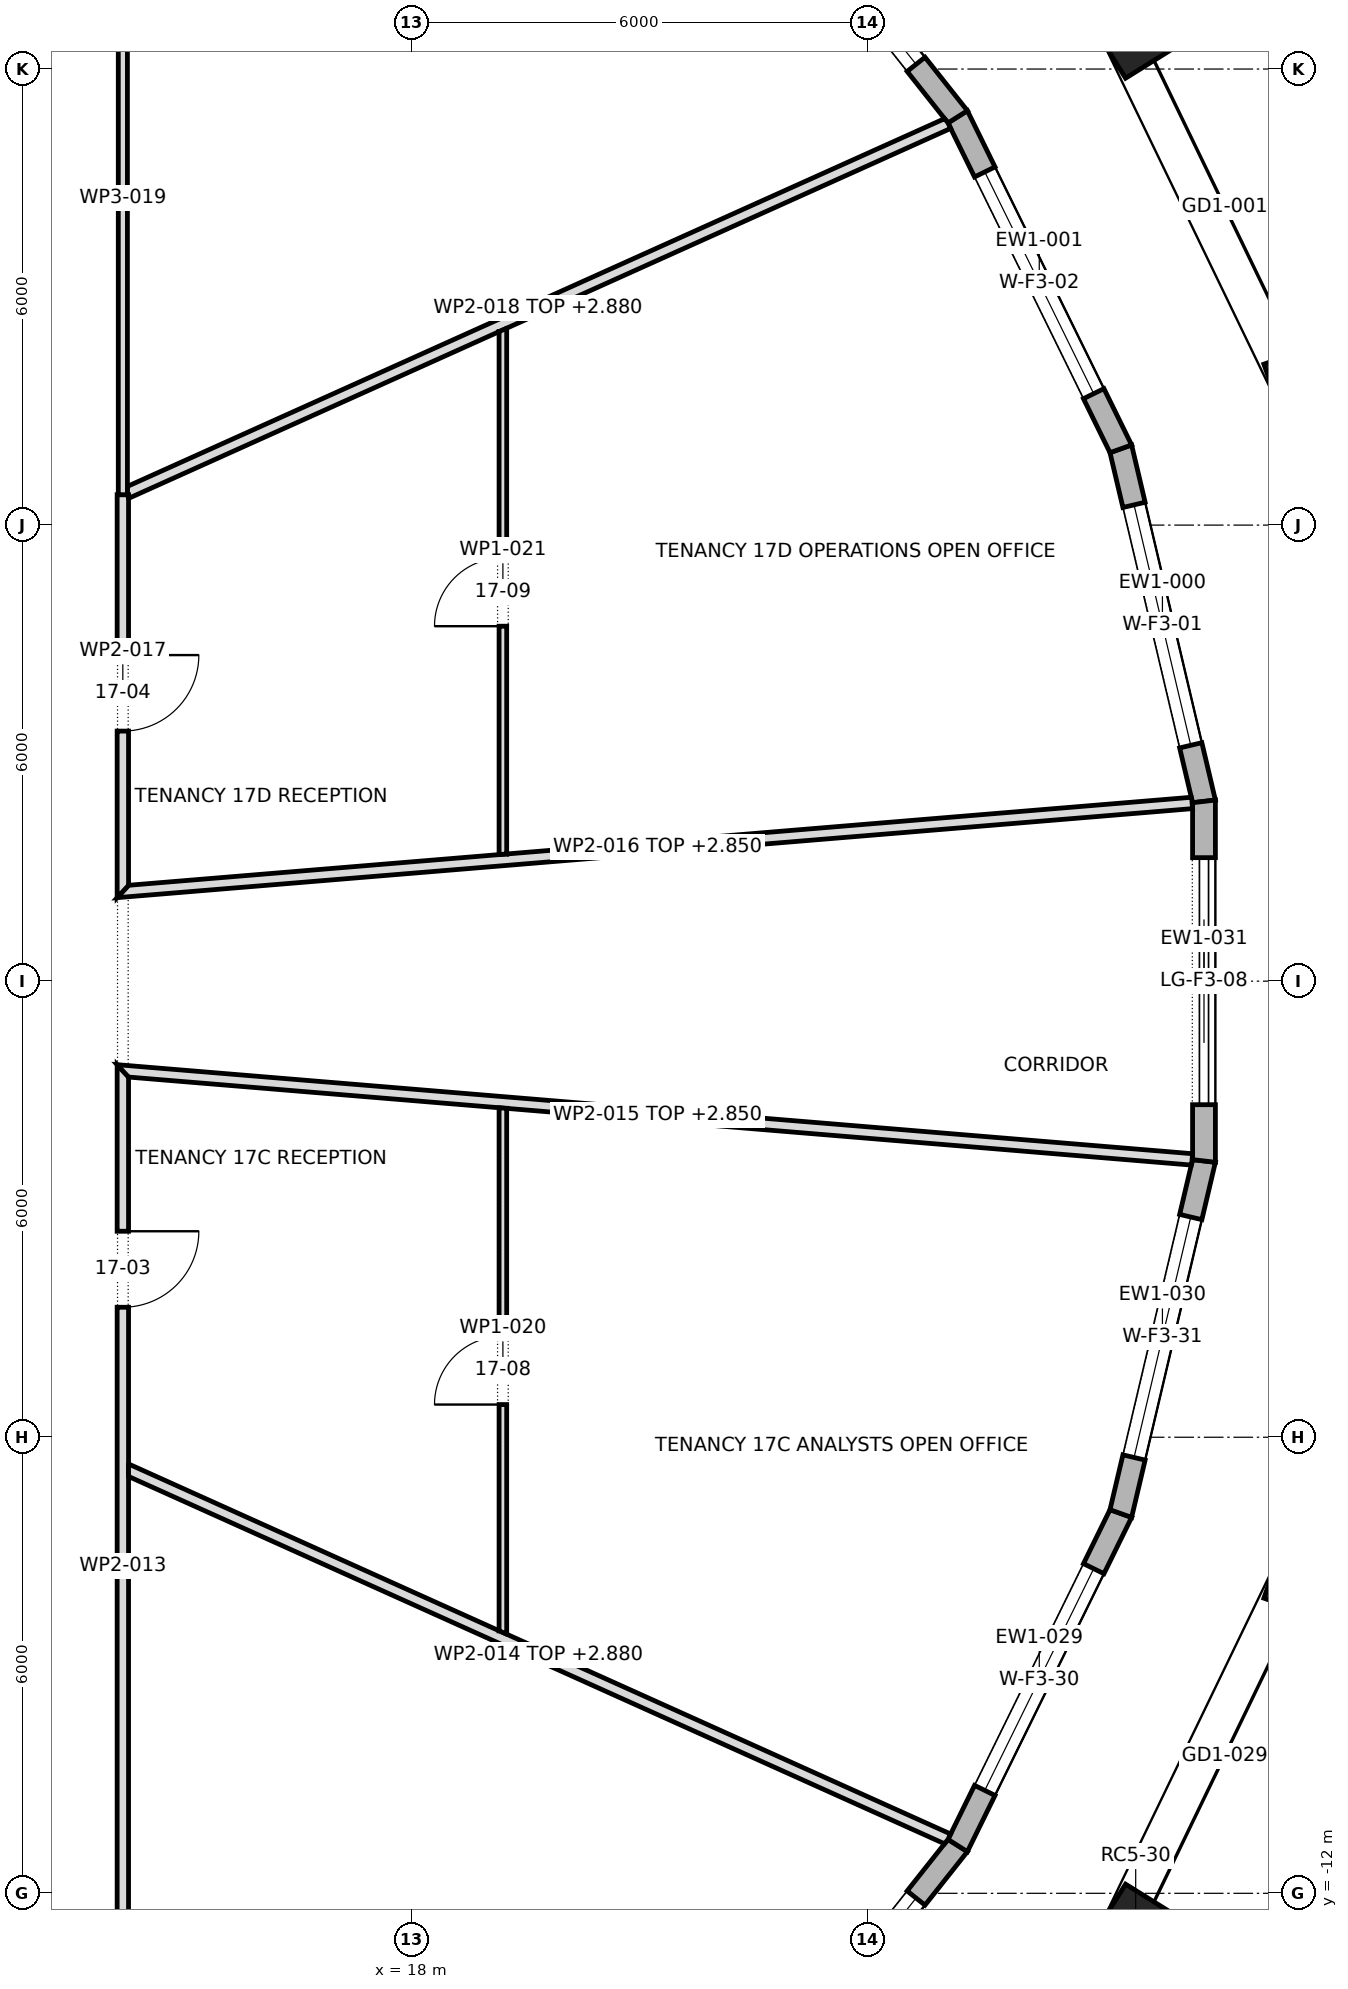
"""IFC4 building model, lengths in metres.
Left out: names, types, materials, properties, quantities, classifications, styles, units other than length and angle.
Written with IfcOpenShell. Run it as: python <this file> out.ifc"""

import sys

from ifc_helpers import new_model, si_unit, direction, frame, frame_2d, origin, origin_2d, place, context, subcontext, project, spatial, polyline, rectangle, outline, extrude, element, fill, save


model = new_model("IFC4")
c1 = context("Model", 3, precision=1e-05, world=origin(), true_north=direction((0.0, 1.0)))
c2 = subcontext(c1, "Body", "Model", "MODEL_VIEW")
j1 = project(units=[si_unit("LENGTHUNIT", "METRE"), si_unit("PLANEANGLEUNIT", "RADIAN")], contexts=[c1])
p1 = place(None, origin())
s1 = spatial("IfcSite", under=j1, at=p1, CompositionType="ELEMENT")
p2 = place(p1, origin())
s2 = spatial("IfcBuilding", under=s1, at=p2, CompositionType="ELEMENT")
p3 = place(p2, frame((0.0, 0.0, 238.9)))
s3 = spatial("IfcBuildingStorey", under=s2, at=p3, CompositionType="ELEMENT", Elevation=238.9)
for number, where, z_axis, x_axis in (
    (1, (29.867, 7.766, 0.0), (0.0, 0.0, 1.0), (-0.334, 0.943, 0.0)),
    (2, (27.525, 12.611, 0.0), (0.0, 0.0, 1.0), (-0.529, 0.849, 0.0)),
    (3, (27.525, -12.611, 0.0), (0.0, 0.0, 1.0), (0.529, 0.849, 0.0)),
    (4, (29.867, -7.766, 0.0), (0.0, 0.0, 1.0), (0.334, 0.943, 0.0)),
):
    element("IfcColumn", number, at=place(p3, frame(where, z_axis=z_axis, x_axis=x_axis)), inside=s3, PredefinedType="COLUMN", context=c2, shape_type="SweptSolid", body=[
        extrude(rectangle(XDim=1.1, YDim=1.0, at=origin_2d()), origin(), (0.0, 0.0, 1.0), 4.0),
    ])
p4 = place(p3, frame((28.424, 2.365, 0.0), z_axis=(0.0, 0.0, 1.0), x_axis=(-0.229593205094, 0.973286679337, 0.0)))
e5 = element("IfcWall", 5, at=p4, inside=s3, PredefinedType="STANDARD", context=c2, shape_type="SweptSolid", body=[
    extrude(outline(polyline([(-0.018, -0.15), (4.783, -0.15), (4.749, 0.15), (0.018, 0.15), (-0.018, -0.15)])), origin(), (0.0, 0.0, 1.0), 3.7),
])
p5 = place(p4, frame((0.758, 0.0, 0.6)))
e6 = element("IfcOpeningElement", 6, at=p5, cuts=e5, PredefinedType="OPENING", context=c2, shape_type="SweptSolid", body=[
    extrude(rectangle(XDim=3.25, YDim=2.65, at=frame_2d((1.625, 1.325))), frame((0.0, 0.162, 0.0), z_axis=(0.0, -1.0, 0.0), x_axis=(1.0, 0.0, 0.0)), (0.0, 0.0, 1.0), 0.324),
])
p6 = place(p3, frame((27.329, 7.004, 0.0), z_axis=(0.0, 0.0, 1.0), x_axis=(-0.441001730708, 0.897506252632, 0.0)))
e7 = element("IfcWall", 7, at=p6, inside=s3, PredefinedType="STANDARD", context=c2, shape_type="SweptSolid", body=[
    extrude(outline(polyline([(-0.017, -0.15), (4.882, -0.15), (4.85, 0.15), (0.017, 0.15), (-0.017, -0.15)])), origin(), (0.0, 0.0, 1.0), 3.7),
])
p7 = place(p6, frame((0.808, 0.0, 0.6)))
e8 = element("IfcOpeningElement", 8, at=p7, cuts=e7, PredefinedType="OPENING", context=c2, shape_type="SweptSolid", body=[
    extrude(rectangle(XDim=3.25, YDim=2.65, at=frame_2d((1.625, 1.325))), frame((0.0, 0.162, 0.0), z_axis=(0.0, -1.0, 0.0), x_axis=(1.0, 0.0, 0.0)), (0.0, 0.0, 1.0), 0.324),
])
p8 = place(p3, frame((25.183, 11.371, 0.0), z_axis=(0.0, 0.0, 1.0), x_axis=(-0.621130746167, 0.783706958094, 0.0)))
e9 = element("IfcWall", 9, at=p8, inside=s3, PredefinedType="STANDARD", context=c2, shape_type="SweptSolid", body=[
    extrude(outline(polyline([(-0.016, -0.15), (5.028, -0.15), (4.998, 0.15), (0.016, 0.15), (-0.016, -0.15)])), origin(), (0.0, 0.0, 1.0), 3.7),
])
p9 = place(p8, frame((0.881, 0.0, 0.6)))
e10 = element("IfcOpeningElement", 10, at=p9, cuts=e9, PredefinedType="OPENING", context=c2, shape_type="SweptSolid", body=[
    extrude(rectangle(XDim=3.25, YDim=2.65, at=frame_2d((1.625, 1.325))), frame((0.0, 0.162, 0.0), z_axis=(0.0, -1.0, 0.0), x_axis=(1.0, 0.0, 0.0)), (0.0, 0.0, 1.0), 0.324),
])
p10 = place(p3, frame((22.07, -15.3, 0.0), z_axis=(0.0, 0.0, 1.0), x_axis=(0.621130746167, 0.783706958094, 0.0)))
e11 = element("IfcWall", 11, at=p10, inside=s3, PredefinedType="STANDARD", context=c2, shape_type="SweptSolid", body=[
    extrude(outline(polyline([(-0.015, -0.15), (5.029, -0.15), (4.997, 0.15), (0.015, 0.15), (-0.015, -0.15)])), origin(), (0.0, 0.0, 1.0), 3.7),
])
p11 = place(p10, frame((0.881, 0.0, 0.6)))
e12 = element("IfcOpeningElement", 12, at=p11, cuts=e11, PredefinedType="OPENING", context=c2, shape_type="SweptSolid", body=[
    extrude(rectangle(XDim=3.25, YDim=2.65, at=frame_2d((1.625, 1.325))), frame((0.0, 0.162, 0.0), z_axis=(0.0, -1.0, 0.0), x_axis=(1.0, 0.0, 0.0)), (0.0, 0.0, 1.0), 0.324),
])
p12 = place(p3, frame((25.183, -11.371, 0.0), z_axis=(0.0, 0.0, 1.0), x_axis=(0.441001730708, 0.897506252632, 0.0)))
e13 = element("IfcWall", 13, at=p12, inside=s3, PredefinedType="STANDARD", context=c2, shape_type="SweptSolid", body=[
    extrude(outline(polyline([(-0.016, -0.15), (4.883, -0.15), (4.849, 0.15), (0.016, 0.15), (-0.016, -0.15)])), origin(), (0.0, 0.0, 1.0), 3.7),
])
p13 = place(p12, frame((0.808, 0.0, 0.6)))
e14 = element("IfcOpeningElement", 14, at=p13, cuts=e13, PredefinedType="OPENING", context=c2, shape_type="SweptSolid", body=[
    extrude(rectangle(XDim=3.25, YDim=2.65, at=frame_2d((1.625, 1.325))), frame((0.0, 0.162, 0.0), z_axis=(0.0, -1.0, 0.0), x_axis=(1.0, 0.0, 0.0)), (0.0, 0.0, 1.0), 0.324),
])
p14 = place(p3, frame((27.329, -7.004, 0.0), z_axis=(0.0, 0.0, 1.0), x_axis=(0.229593205094, 0.973286679337, 0.0)))
e15 = element("IfcWall", 15, at=p14, inside=s3, PredefinedType="STANDARD", context=c2, shape_type="SweptSolid", body=[
    extrude(outline(polyline([(-0.017, -0.15), (4.783, -0.15), (4.748, 0.15), (0.017, 0.15), (-0.017, -0.15)])), origin(), (0.0, 0.0, 1.0), 3.7),
])
p15 = place(p14, frame((0.758, 0.0, 0.6)))
e16 = element("IfcOpeningElement", 16, at=p15, cuts=e15, PredefinedType="OPENING", context=c2, shape_type="SweptSolid", body=[
    extrude(rectangle(XDim=3.25, YDim=2.65, at=frame_2d((1.625, 1.325))), frame((0.0, 0.162, 0.0), z_axis=(0.0, -1.0, 0.0), x_axis=(1.0, 0.0, 0.0)), (0.0, 0.0, 1.0), 0.324),
])
p16 = place(p3, frame((28.424, -2.365, 0.0), z_axis=(0.0, 0.0, 1.0), x_axis=(0.0, 1.0, 0.0)))
e17 = element("IfcWall", 17, at=p16, inside=s3, PredefinedType="STANDARD", context=c2, shape_type="SweptSolid", body=[
    extrude(outline(polyline([(-0.018, -0.15), (4.748, -0.15), (4.713, 0.15), (0.018, 0.15), (-0.018, -0.15)])), origin(), (0.0, 0.0, 1.0), 3.7),
])
p17 = place(p16, frame((0.74, 0.0, 0.0)))
e18 = element("IfcOpeningElement", 18, at=p17, cuts=e17, PredefinedType="OPENING", context=c2, shape_type="SweptSolid", body=[
    extrude(rectangle(XDim=3.25, YDim=3.25, at=frame_2d((1.625, 1.625))), frame((0.0, 0.162, 0.0), z_axis=(0.0, -1.0, 0.0), x_axis=(1.0, 0.0, 0.0)), (0.0, 0.0, 1.0), 0.324),
])
p18 = place(p3, frame((14.2, -14.275, 0.0), z_axis=(0.0, 0.0, 1.0), x_axis=(0.0, 1.0, 0.0)))
e19 = element("IfcWall", 19, at=p18, inside=s3, PredefinedType="PARTITIONING", context=c2, shape_type="SweptSolid", body=[
    extrude(outline(polyline([(0.0, -0.075), (1.859, -0.075), (3.718, -0.075), (5.577, -0.075), (7.436, -0.075), (9.295, -0.075), (11.155, -0.075), (13.013, -0.075), (13.176, 0.075), (11.315, 0.075), (9.455, 0.075), (7.594, 0.075), (5.733, 0.075), (3.872, 0.075), (2.011, 0.075), (0.15, 0.075), (0.0, -0.075)])), origin(), (0.0, 0.0, 1.0), 3.7),
])
p19 = place(p18, frame((9.985, 0.0, 0.0)))
e20 = element("IfcOpeningElement", 20, at=p19, cuts=e19, PredefinedType="OPENING", context=c2, shape_type="SweptSolid", body=[
    extrude(rectangle(XDim=1.0, YDim=2.1, at=frame_2d((0.5, 1.05))), frame((0.0, 0.087, 0.0), z_axis=(0.0, -1.0, 0.0), x_axis=(1.0, 0.0, 0.0)), (0.0, 0.0, 1.0), 0.174),
])
p20 = place(p3, frame((14.245, -6.42, 0.0), z_axis=(0.0, 0.0, 1.0), x_axis=(0.911879517983, -0.410457969448, 0.0)))
e21 = element("IfcWall", 21, at=p20, inside=s3, PredefinedType="PARTITIONING", context=c2, shape_type="SweptSolid", body=[
    extrude(outline(polyline([(0.067, -0.075), (2.029, -0.075), (3.991, -0.075), (5.953, -0.075), (7.916, -0.075), (9.878, -0.075), (11.84, -0.075), (11.858, -0.004), (11.86, 0.075), (10.233, 0.075), (8.605, 0.075), (6.977, 0.075), (5.349, 0.075), (5.346, 0.073), (5.346, 0.075), (3.564, 0.075), (1.782, 0.075), (0.0, 0.075), (0.0, 0.074), (0.067, -0.075)])), origin(), (0.0, 0.0, 1.0), 2.88),
])
p21 = place(p3, frame((14.119, -1.173, 0.0), z_axis=(0.0, 0.0, 1.0), x_axis=(0.996590090632, -0.082511764333, 0.0)))
e22 = element("IfcWall", 22, at=p21, inside=s3, PredefinedType="PARTITIONING", context=c2, shape_type="SweptSolid", body=[
    extrude(outline(polyline([(0.163, -0.075), (1.823, -0.075), (3.484, -0.075), (5.144, -0.075), (5.155, -0.074), (5.155, -0.075), (6.962, -0.075), (8.77, -0.075), (10.577, -0.075), (12.385, -0.075), (14.193, -0.075), (14.197, -0.048), (14.197, 0.075), (12.422, 0.075), (10.647, 0.075), (8.873, 0.075), (7.098, 0.075), (5.324, 0.075), (3.549, 0.075), (1.775, 0.075), (0.0, 0.075), (0.081, 0.0), (0.163, -0.075)])), origin(), (0.0, 0.0, 1.0), 2.85),
])
p22 = place(p3, frame((14.119, 1.173, 0.0), z_axis=(0.0, 0.0, 1.0), x_axis=(0.996590090632, 0.082511764333, 0.0)))
e23 = element("IfcWall", 23, at=p22, inside=s3, PredefinedType="PARTITIONING", context=c2, shape_type="SweptSolid", body=[
    extrude(outline(polyline([(14.197, -0.075), (14.197, 0.048), (14.193, 0.075), (12.385, 0.075), (10.577, 0.075), (8.77, 0.075), (6.962, 0.075), (5.155, 0.075), (5.155, 0.074), (5.144, 0.075), (3.484, 0.075), (1.823, 0.075), (0.163, 0.075), (0.081, 0.0), (0.0, -0.075), (1.775, -0.075), (3.549, -0.075), (5.324, -0.075), (7.098, -0.075), (8.873, -0.075), (10.647, -0.075), (12.422, -0.075), (14.197, -0.075)])), origin(), (0.0, 0.0, 1.0), 2.85),
])
p23 = place(p3, frame((14.2, 6.4, 0.0), z_axis=(0.0, 0.0, 1.0), x_axis=(0.0, -1.0, 0.0)))
e24 = element("IfcWall", 24, at=p23, inside=s3, PredefinedType="PARTITIONING", context=c2, shape_type="SweptSolid", body=[
    extrude(outline(polyline([(0.0, -0.075), (1.767, -0.075), (3.534, -0.075), (5.301, -0.075), (5.138, 0.075), (3.426, 0.075), (1.713, 0.075), (0.0, 0.075), (0.0, -0.075)])), origin(), (0.0, 0.0, 1.0), 3.7),
])
p24 = place(p23, frame((2.11, 0.0, 0.0)))
e25 = element("IfcOpeningElement", 25, at=p24, cuts=e24, PredefinedType="OPENING", context=c2, shape_type="SweptSolid", body=[
    extrude(rectangle(XDim=1.0, YDim=2.1, at=frame_2d((0.5, 1.05))), frame((0.0, 0.087, 0.0), z_axis=(0.0, -1.0, 0.0), x_axis=(1.0, 0.0, 0.0)), (0.0, 0.0, 1.0), 0.174),
])
p25 = place(p3, frame((14.245, 6.42, 0.0), z_axis=(0.0, 0.0, 1.0), x_axis=(0.911924971597, 0.410356974082, 0.0)))
e26 = element("IfcWall", 26, at=p25, inside=s3, PredefinedType="PARTITIONING", context=c2, shape_type="SweptSolid", body=[
    extrude(outline(polyline([(0.0, -0.075), (1.782, -0.075), (3.564, -0.075), (5.345, -0.075), (5.346, -0.073), (5.351, -0.075), (6.978, -0.075), (8.605, -0.075), (10.233, -0.075), (11.86, -0.075), (11.86, -0.074), (11.858, 0.005), (11.84, 0.075), (9.875, 0.075), (7.91, 0.075), (5.945, 0.075), (3.98, 0.075), (2.015, 0.075), (0.051, 0.075), (0.006, -0.025), (0.02, -0.031), (0.0, -0.074), (0.0, -0.075)])), origin(), (0.0, 0.0, 1.0), 2.88),
])
p26 = place(p3, frame((14.2, 14.26, 0.0), z_axis=(0.0, 0.0, 1.0), x_axis=(0.0, -1.0, 0.0)))
e27 = element("IfcWall", 27, at=p26, inside=s3, PredefinedType="PARTITIONING", context=c2, shape_type="SweptSolid", body=[
    extrude(outline(polyline([(7.86, 0.06), (5.895, 0.06), (3.93, 0.06), (1.965, 0.06), (0.0, 0.06), (0.12, -0.06), (2.055, -0.06), (3.99, -0.06), (5.925, -0.06), (7.86, -0.06), (7.86, 0.06)])), origin(), (0.0, 0.0, 1.0), 3.7),
])
p27 = place(p3, frame((19.2, -1.666, 0.0), z_axis=(0.0, 0.0, 1.0), x_axis=(0.0, -1.0, 0.0)))
e28 = element("IfcWall", 28, at=p27, inside=s3, PredefinedType="PARTITIONING", context=c2, shape_type="SweptSolid", body=[
    extrude(outline(polyline([(0.0, -0.05), (1.72, -0.05), (3.44, -0.05), (5.16, -0.05), (6.88, -0.05), (6.925, 0.049), (6.925, 0.05), (5.196, 0.05), (3.467, 0.05), (1.737, 0.05), (0.008, 0.05), (0.0, -0.045), (0.0, -0.05)])), origin(), (0.0, 0.0, 1.0), 3.7),
])
p28 = place(p27, frame((3.004, 0.0, 0.0)))
e29 = element("IfcOpeningElement", 29, at=p28, cuts=e28, PredefinedType="OPENING", context=c2, shape_type="SweptSolid", body=[
    extrude(rectangle(XDim=0.9, YDim=2.1, at=frame_2d((0.45, 1.05))), frame((0.0, 0.062, 0.0), z_axis=(0.0, -1.0, 0.0), x_axis=(1.0, 0.0, 0.0)), (0.0, 0.0, 1.0), 0.124),
])
p29 = place(p3, frame((19.2, 8.59, 0.0), z_axis=(0.0, 0.0, 1.0), x_axis=(0.0, -1.0, 0.0)))
e30 = element("IfcWall", 30, at=p29, inside=s3, PredefinedType="PARTITIONING", context=c2, shape_type="SweptSolid", body=[
    extrude(outline(polyline([(6.925, -0.05), (6.925, -0.045), (6.917, 0.05), (5.188, 0.05), (3.458, 0.05), (1.729, 0.05), (0.0, 0.05), (0.0, 0.05), (0.045, -0.05), (1.765, -0.05), (3.485, -0.05), (5.205, -0.05), (6.925, -0.05)])), origin(), (0.0, 0.0, 1.0), 3.7),
])
p30 = place(p29, frame((3.02, 0.0, 0.0)))
e31 = element("IfcOpeningElement", 31, at=p30, cuts=e30, PredefinedType="OPENING", context=c2, shape_type="SweptSolid", body=[
    extrude(rectangle(XDim=0.9, YDim=2.1, at=frame_2d((0.45, 1.05))), frame((0.0, 0.062, 0.0), z_axis=(0.0, -1.0, 0.0), x_axis=(1.0, 0.0, 0.0)), (0.0, 0.0, 1.0), 0.124),
])
p31 = place(p5, origin())
e32 = element("IfcWindow", 32, at=p31, inside=s3, PartitioningType="TRIPLE_PANEL_VERTICAL", PredefinedType="WINDOW", context=c2, shape_type="SweptSolid", body=[
    extrude(rectangle(XDim=3.25, YDim=2.65, at=frame_2d((1.625, 1.325))), frame((0.0, 0.03, 0.0), z_axis=(0.0, -1.0, 0.0), x_axis=(1.0, 0.0, 0.0)), (0.0, 0.0, 1.0), 0.06),
])
fill(e6, e32)
p32 = place(p7, origin())
e33 = element("IfcWindow", 33, at=p32, inside=s3, PartitioningType="TRIPLE_PANEL_VERTICAL", PredefinedType="WINDOW", context=c2, shape_type="SweptSolid", body=[
    extrude(rectangle(XDim=3.25, YDim=2.65, at=frame_2d((1.625, 1.325))), frame((0.0, 0.03, 0.0), z_axis=(0.0, -1.0, 0.0), x_axis=(1.0, 0.0, 0.0)), (0.0, 0.0, 1.0), 0.06),
])
fill(e8, e33)
p33 = place(p9, origin())
e34 = element("IfcWindow", 34, at=p33, inside=s3, PartitioningType="TRIPLE_PANEL_VERTICAL", PredefinedType="WINDOW", context=c2, shape_type="SweptSolid", body=[
    extrude(rectangle(XDim=3.25, YDim=2.65, at=frame_2d((1.625, 1.325))), frame((0.0, 0.03, 0.0), z_axis=(0.0, -1.0, 0.0), x_axis=(1.0, 0.0, 0.0)), (0.0, 0.0, 1.0), 0.06),
])
fill(e10, e34)
p34 = place(p11, origin())
e35 = element("IfcWindow", 35, at=p34, inside=s3, PartitioningType="TRIPLE_PANEL_VERTICAL", PredefinedType="WINDOW", context=c2, shape_type="SweptSolid", body=[
    extrude(rectangle(XDim=3.25, YDim=2.65, at=frame_2d((1.625, 1.325))), frame((0.0, 0.03, 0.0), z_axis=(0.0, -1.0, 0.0), x_axis=(1.0, 0.0, 0.0)), (0.0, 0.0, 1.0), 0.06),
])
fill(e12, e35)
p35 = place(p13, origin())
e36 = element("IfcWindow", 36, at=p35, inside=s3, PartitioningType="TRIPLE_PANEL_VERTICAL", PredefinedType="WINDOW", context=c2, shape_type="SweptSolid", body=[
    extrude(rectangle(XDim=3.25, YDim=2.65, at=frame_2d((1.625, 1.325))), frame((0.0, 0.03, 0.0), z_axis=(0.0, -1.0, 0.0), x_axis=(1.0, 0.0, 0.0)), (0.0, 0.0, 1.0), 0.06),
])
fill(e14, e36)
p36 = place(p15, origin())
e37 = element("IfcWindow", 37, at=p36, inside=s3, PartitioningType="TRIPLE_PANEL_VERTICAL", PredefinedType="WINDOW", context=c2, shape_type="SweptSolid", body=[
    extrude(rectangle(XDim=3.25, YDim=2.65, at=frame_2d((1.625, 1.325))), frame((0.0, 0.03, 0.0), z_axis=(0.0, -1.0, 0.0), x_axis=(1.0, 0.0, 0.0)), (0.0, 0.0, 1.0), 0.06),
])
fill(e16, e37)
p37 = place(p17, origin())
e38 = element("IfcDoor", 38, at=p37, inside=s3, OperationType="DOUBLE_DOOR_SLIDING", PredefinedType="DOOR", context=c2, shape_type="SweptSolid", body=[
    extrude(rectangle(XDim=3.25, YDim=3.25, at=frame_2d((1.625, 1.625))), frame((0.0, 0.025, 0.0), z_axis=(0.0, -1.0, 0.0), x_axis=(1.0, 0.0, 0.0)), (0.0, 0.0, 1.0), 0.05),
])
fill(e18, e38)
p38 = place(p19, frame((1.0, 0.0, 0.0), z_axis=(0.0, 0.0, 1.0), x_axis=(-1.0, 0.0, 0.0)))
e39 = element("IfcDoor", 39, at=p38, inside=s3, OperationType="SINGLE_SWING_RIGHT", PredefinedType="DOOR", context=c2, shape_type="SweptSolid", body=[
    extrude(rectangle(XDim=1.0, YDim=2.1, at=frame_2d((0.5, 1.05))), frame((0.0, 0.025, 0.0), z_axis=(0.0, -1.0, 0.0), x_axis=(1.0, 0.0, 0.0)), (0.0, 0.0, 1.0), 0.05),
])
fill(e20, e39)
p39 = place(p24, origin())
e40 = element("IfcDoor", 40, at=p39, inside=s3, OperationType="SINGLE_SWING_RIGHT", PredefinedType="DOOR", context=c2, shape_type="SweptSolid", body=[
    extrude(rectangle(XDim=1.0, YDim=2.1, at=frame_2d((0.5, 1.05))), frame((0.0, 0.025, 0.0), z_axis=(0.0, -1.0, 0.0), x_axis=(1.0, 0.0, 0.0)), (0.0, 0.0, 1.0), 0.05),
])
fill(e25, e40)
p40 = place(p28, frame((0.9, 0.0, 0.0), z_axis=(0.0, 0.0, 1.0), x_axis=(-1.0, 0.0, 0.0)))
e41 = element("IfcDoor", 41, at=p40, inside=s3, OperationType="SINGLE_SWING_RIGHT", PredefinedType="DOOR", context=c2, shape_type="SweptSolid", body=[
    extrude(rectangle(XDim=0.9, YDim=2.1, at=frame_2d((0.45, 1.05))), frame((0.0, 0.025, 0.0), z_axis=(0.0, -1.0, 0.0), x_axis=(1.0, 0.0, 0.0)), (0.0, 0.0, 1.0), 0.05),
])
fill(e29, e41)
p41 = place(p30, frame((0.9, 0.0, 0.0), z_axis=(0.0, 0.0, 1.0), x_axis=(-1.0, 0.0, 0.0)))
e42 = element("IfcDoor", 42, at=p41, inside=s3, OperationType="SINGLE_SWING_RIGHT", PredefinedType="DOOR", context=c2, shape_type="SweptSolid", body=[
    extrude(rectangle(XDim=0.9, YDim=2.1, at=frame_2d((0.45, 1.05))), frame((0.0, 0.025, 0.0), z_axis=(0.0, -1.0, 0.0), x_axis=(1.0, 0.0, 0.0)), (0.0, 0.0, 1.0), 0.05),
])
fill(e31, e42)
save(model, sys.argv[1])
